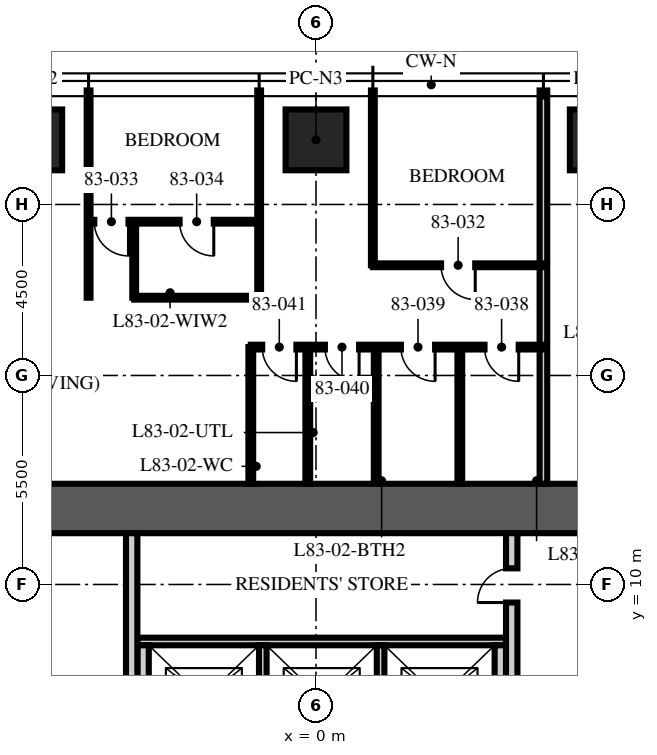
"""IFC4 building model, lengths in metres.
Left out: names, types, materials, properties, quantities, classifications, styles, units other than length and angle.
Written with IfcOpenShell. Run it as: python <this file> out.ifc"""

import sys

from ifc_helpers import new_model, si_unit, direction, frame, frame_2d, origin, origin_2d, place, context, subcontext, project, spatial, rectangle, extrude, element, fill, save


model = new_model("IFC4")
c1 = context("Model", 3, precision=1e-05, world=origin(), true_north=direction((0.0, 1.0)))
c2 = subcontext(c1, "Body", "Model", "MODEL_VIEW")
j1 = project(units=[si_unit("LENGTHUNIT", "METRE"), si_unit("PLANEANGLEUNIT", "RADIAN")], contexts=[c1])
p1 = place(None, origin())
s1 = spatial("IfcSite", under=j1, at=p1, CompositionType="ELEMENT")
p2 = place(p1, origin())
s2 = spatial("IfcBuilding", under=s1, at=p2, CompositionType="ELEMENT")
p3 = place(p2, frame((0.0, 0.0, 330.75)))
s3 = spatial("IfcBuildingStorey", under=s2, at=p3, CompositionType="ELEMENT", Elevation=330.75)
p4 = place(p3, frame((-15.5, 12.0, -0.25), z_axis=(0.0, 0.0, 1.0), x_axis=(1.0, 0.0, 0.0)))
e1 = element("IfcWall", 1, at=p4, inside=s3, PredefinedType="SHEAR", context=c2, shape_type="SweptSolid", body=[
    extrude(rectangle(XDim=31.0, YDim=1.3, at=frame_2d((15.5, 0.0))), origin(), (0.0, 0.0, 1.0), 3.75),
])
for number, where, z_axis, x_axis in (
    (2, (-7.48, 21.7, 0.0), (0.0, 0.0, 1.0), (1.0, 0.0, 0.0)),
    (3, (0.0, 21.7, 0.0), (0.0, 0.0, 1.0), (1.0, 0.0, 0.0)),
    (4, (7.48, 21.7, 0.0), (0.0, 0.0, 1.0), (1.0, 0.0, 0.0)),
):
    element("IfcColumn", number, at=place(p3, frame(where, z_axis=z_axis, x_axis=x_axis)), inside=s3, PredefinedType="COLUMN", context=c2, shape_type="SweptSolid", body=[
        extrude(rectangle(XDim=1.6, YDim=1.6, at=origin_2d()), origin(), (0.0, 0.0, 1.0), 3.75),
    ])
p5 = place(p3, frame((-4.7, 8.5, 0.0), z_axis=(0.0, 0.0, 1.0), x_axis=(1.0, 0.0, 0.0)))
e5 = element("IfcWall", 5, at=p5, inside=s3, PredefinedType="PARTITIONING", context=c2, shape_type="SweptSolid", body=[
    extrude(rectangle(XDim=9.7, YDim=0.2, at=frame_2d((4.85, 0.0))), origin(), (0.0, 0.0, 1.0), 3.5),
])
for number, where, z_axis, x_axis in (
    (6, (-4.55, 5.6, 0.0), (0.0, 0.0, 1.0), (0.0, 1.0, 0.0)),
    (7, (4.85, 5.6, 0.0), (0.0, 0.0, 1.0), (0.0, 1.0, 0.0)),
):
    element("IfcWall", number, at=place(p3, frame(where, z_axis=z_axis, x_axis=x_axis)), inside=s3, PredefinedType="PARTITIONING", context=c2, shape_type="SweptSolid", body=[
        extrude(rectangle(XDim=2.8, YDim=0.3, at=frame_2d((1.4, 0.0))), origin(), (0.0, 0.0, 1.0), 3.5),
    ])
for number, where, z_axis, x_axis in (
    (8, (-1.4, 5.6, 0.0), (0.0, 0.0, 1.0), (0.0, 1.0, 0.0)),
    (9, (1.7, 5.6, 0.0), (0.0, 0.0, 1.0), (0.0, 1.0, 0.0)),
):
    element("IfcWall", number, at=place(p3, frame(where, z_axis=z_axis, x_axis=x_axis)), inside=s3, PredefinedType="PARTITIONING", context=c2, shape_type="SweptSolid", body=[
        extrude(rectangle(XDim=2.8, YDim=0.2, at=frame_2d((1.4, 0.0))), origin(), (0.0, 0.0, 1.0), 3.5),
    ])
p6 = place(p3, frame((-4.85, 5.3, 0.0), z_axis=(0.0, 0.0, 1.0), x_axis=(0.0, 1.0, 0.0)))
e10 = element("IfcWall", 10, at=p6, inside=s3, PredefinedType="PARTITIONING", context=c2, shape_type="SweptSolid", body=[
    extrude(rectangle(XDim=6.05, YDim=0.3, at=frame_2d((3.025, 0.0))), origin(), (0.0, 0.0, 1.0), 3.5),
])
p7 = place(p3, frame((5.15, 5.3, 0.0), z_axis=(0.0, 0.0, 1.0), x_axis=(0.0, 1.0, 0.0)))
e11 = element("IfcWall", 11, at=p7, inside=s3, PredefinedType="PARTITIONING", context=c2, shape_type="SweptSolid", body=[
    extrude(rectangle(XDim=6.05, YDim=0.3, at=frame_2d((3.025, 0.0))), origin(), (0.0, 0.0, 1.0), 3.5),
])
p8 = place(p7, frame((4.225, 0.0, 0.0)))
e12 = element("IfcOpeningElement", 12, at=p8, cuts=e11, PredefinedType="OPENING", context=c2, shape_type="SweptSolid", body=[
    extrude(rectangle(XDim=0.9, YDim=2.1, at=frame_2d((0.45, 1.05))), frame((0.0, 0.16, 0.0), z_axis=(0.0, -1.0, 0.0), x_axis=(1.0, 0.0, 0.0)), (0.0, 0.0, 1.0), 0.32),
])
p9 = place(p3, frame((5.984, 12.65, 0.0), z_axis=(0.0, 0.0, 1.0), x_axis=(0.0, 1.0, 0.0)))
e13 = element("IfcWall", 13, at=p9, inside=s3, PredefinedType="PARTITIONING", context=c2, shape_type="SweptSolid", body=[
    extrude(rectangle(XDim=10.35, YDim=0.2, at=frame_2d((5.175, 0.0))), origin(), (0.0, 0.0, 1.0), 3.01),
])
p10 = place(p3, frame((1.496, 18.4, 0.0), z_axis=(0.0, 0.0, 1.0), x_axis=(0.0, 1.0, 0.0)))
e14 = element("IfcWall", 14, at=p10, inside=s3, PredefinedType="PARTITIONING", context=c2, shape_type="SweptSolid", body=[
    extrude(rectangle(XDim=4.6, YDim=0.1, at=frame_2d((2.3, 0.0))), origin(), (0.0, 0.0, 1.0), 3.01),
])
for number, where, z_axis, x_axis in (
    (15, (-1.496, 17.546, 0.0), (0.0, 0.0, 1.0), (0.0, 1.0, 0.0)),
    (16, (-5.984, 17.546, 0.0), (0.0, 0.0, 1.0), (0.0, 1.0, 0.0)),
):
    element("IfcWall", number, at=place(p3, frame(where, z_axis=z_axis, x_axis=x_axis)), inside=s3, PredefinedType="PARTITIONING", context=c2, shape_type="SweptSolid", body=[
        extrude(rectangle(XDim=5.454, YDim=0.1, at=frame_2d((2.727, 0.0))), origin(), (0.0, 0.0, 1.0), 3.01),
    ])
p11 = place(p3, frame((5.984, 18.4, 0.0), z_axis=(0.0, 0.0, 1.0), x_axis=(-1.0, 0.0, 0.0)))
e17 = element("IfcWall", 17, at=p11, inside=s3, PredefinedType="PARTITIONING", context=c2, shape_type="SweptSolid", body=[
    extrude(rectangle(XDim=4.488, YDim=0.1, at=frame_2d((2.244, 0.0))), origin(), (0.0, 0.0, 1.0), 2.91),
])
p12 = place(p11, frame((1.794, 0.0, 0.0)))
e18 = element("IfcOpeningElement", 18, at=p12, cuts=e17, PredefinedType="OPENING", context=c2, shape_type="SweptSolid", body=[
    extrude(rectangle(XDim=0.9, YDim=2.1, at=frame_2d((0.45, 1.05))), frame((0.0, 0.06, 0.0), z_axis=(0.0, -1.0, 0.0), x_axis=(1.0, 0.0, 0.0)), (0.0, 0.0, 1.0), 0.12),
])
p13 = place(p3, frame((-1.496, 19.546, 0.0), z_axis=(0.0, 0.0, 1.0), x_axis=(-1.0, 0.0, 0.0)))
e19 = element("IfcWall", 19, at=p13, inside=s3, PredefinedType="PARTITIONING", context=c2, shape_type="SweptSolid", body=[
    extrude(rectangle(XDim=4.488, YDim=0.1, at=frame_2d((2.244, 0.0))), origin(), (0.0, 0.0, 1.0), 2.91),
])
p14 = place(p13, frame((3.438, 0.0, 0.0)))
e20 = element("IfcOpeningElement", 20, at=p14, cuts=e19, PredefinedType="OPENING", context=c2, shape_type="SweptSolid", body=[
    extrude(rectangle(XDim=0.9, YDim=2.1, at=frame_2d((0.45, 1.05))), frame((0.0, 0.06, 0.0), z_axis=(0.0, -1.0, 0.0), x_axis=(1.0, 0.0, 0.0)), (0.0, 0.0, 1.0), 0.12),
])
p15 = place(p13, frame((1.194, 0.0, 0.0)))
e21 = element("IfcOpeningElement", 21, at=p15, cuts=e19, PredefinedType="OPENING", context=c2, shape_type="SweptSolid", body=[
    extrude(rectangle(XDim=0.9, YDim=2.1, at=frame_2d((0.45, 1.05))), frame((0.0, 0.06, 0.0), z_axis=(0.0, -1.0, 0.0), x_axis=(1.0, 0.0, 0.0)), (0.0, 0.0, 1.0), 0.12),
])
p16 = place(p3, frame((-4.784, 17.546, 0.0), z_axis=(0.0, 0.0, 1.0), x_axis=(0.0, 1.0, 0.0)))
e22 = element("IfcWall", 22, at=p16, inside=s3, PredefinedType="PARTITIONING", context=c2, shape_type="SweptSolid", body=[
    extrude(rectangle(XDim=2.0, YDim=0.1, at=frame_2d((1.0, 0.0))), origin(), (0.0, 0.0, 1.0), 3.5),
])
p17 = place(p3, frame((-1.496, 17.546, 0.0), z_axis=(0.0, 0.0, 1.0), x_axis=(-1.0, 0.0, 0.0)))
e23 = element("IfcWall", 23, at=p17, inside=s3, PredefinedType="PARTITIONING", context=c2, shape_type="SweptSolid", body=[
    extrude(rectangle(XDim=3.288, YDim=0.1, at=frame_2d((1.644, 0.0))), origin(), (0.0, 0.0, 1.0), 2.91),
])
p18 = place(p3, frame((5.984, 16.246, 0.0), z_axis=(0.0, 0.0, 1.0), x_axis=(-1.0, 0.0, 0.0)))
e24 = element("IfcWall", 24, at=p18, inside=s3, PredefinedType="PARTITIONING", context=c2, shape_type="SweptSolid", body=[
    extrude(rectangle(XDim=7.7, YDim=0.125, at=frame_2d((3.85, 0.0))), origin(), (0.0, 0.0, 1.0), 2.9),
])
p19 = place(p18, frame((0.65, 0.0, 0.0)))
e25 = element("IfcOpeningElement", 25, at=p19, cuts=e24, PredefinedType="OPENING", context=c2, shape_type="SweptSolid", body=[
    extrude(rectangle(XDim=0.9, YDim=2.1, at=frame_2d((0.45, 1.05))), frame((0.0, 0.073, 0.0), z_axis=(0.0, -1.0, 0.0), x_axis=(1.0, 0.0, 0.0)), (0.0, 0.0, 1.0), 0.145),
])
p20 = place(p18, frame((2.85, 0.0, 0.0)))
e26 = element("IfcOpeningElement", 26, at=p20, cuts=e24, PredefinedType="OPENING", context=c2, shape_type="SweptSolid", body=[
    extrude(rectangle(XDim=0.9, YDim=2.1, at=frame_2d((0.45, 1.05))), frame((0.0, 0.073, 0.0), z_axis=(0.0, -1.0, 0.0), x_axis=(1.0, 0.0, 0.0)), (0.0, 0.0, 1.0), 0.145),
])
p21 = place(p18, frame((4.85, 0.0, 0.0)))
e27 = element("IfcOpeningElement", 27, at=p21, cuts=e24, PredefinedType="OPENING", context=c2, shape_type="SweptSolid", body=[
    extrude(rectangle(XDim=0.9, YDim=2.1, at=frame_2d((0.45, 1.05))), frame((0.0, 0.073, 0.0), z_axis=(0.0, -1.0, 0.0), x_axis=(1.0, 0.0, 0.0)), (0.0, 0.0, 1.0), 0.145),
])
p22 = place(p18, frame((6.5, 0.0, 0.0)))
e28 = element("IfcOpeningElement", 28, at=p22, cuts=e24, PredefinedType="OPENING", context=c2, shape_type="SweptSolid", body=[
    extrude(rectangle(XDim=0.9, YDim=2.1, at=frame_2d((0.45, 1.05))), frame((0.0, 0.073, 0.0), z_axis=(0.0, -1.0, 0.0), x_axis=(1.0, 0.0, 0.0)), (0.0, 0.0, 1.0), 0.145),
])
p23 = place(p3, frame((3.784, 12.65, 0.0), z_axis=(0.0, 0.0, 1.0), x_axis=(0.0, 1.0, 0.0)))
e29 = element("IfcWall", 29, at=p23, inside=s3, PredefinedType="PARTITIONING", context=c2, shape_type="SweptSolid", body=[
    extrude(rectangle(XDim=3.596, YDim=0.125, at=frame_2d((1.798, 0.0))), origin(), (0.0, 0.0, 1.0), 2.91),
])
for number, where, z_axis, x_axis in (
    (30, (1.584, 12.65, 0.0), (0.0, 0.0, 1.0), (0.0, 1.0, 0.0)),
    (31, (-0.216, 12.65, 0.0), (0.0, 0.0, 1.0), (0.0, 1.0, 0.0)),
    (32, (-1.716, 12.65, 0.0), (0.0, 0.0, 1.0), (0.0, 1.0, 0.0)),
):
    element("IfcWall", number, at=place(p3, frame(where, z_axis=z_axis, x_axis=x_axis)), inside=s3, PredefinedType="PARTITIONING", context=c2, shape_type="SweptSolid", body=[
        extrude(rectangle(XDim=3.596, YDim=0.125, at=frame_2d((1.798, 0.0))), origin(), (0.0, 0.0, 1.0), 3.5),
    ])
p24 = place(p8, origin())
e33 = element("IfcDoor", 33, at=p24, inside=s3, OperationType="SINGLE_SWING_LEFT", PredefinedType="DOOR", context=c2, shape_type="SweptSolid", body=[
    extrude(rectangle(XDim=0.9, YDim=2.1, at=frame_2d((0.45, 1.05))), frame((0.0, 0.025, 0.0), z_axis=(0.0, -1.0, 0.0), x_axis=(1.0, 0.0, 0.0)), (0.0, 0.0, 1.0), 0.05),
])
fill(e12, e33)
p25 = place(p12, origin())
e34 = element("IfcDoor", 34, at=p25, inside=s3, OperationType="SINGLE_SWING_LEFT", PredefinedType="DOOR", context=c2, shape_type="SweptSolid", body=[
    extrude(rectangle(XDim=0.9, YDim=2.1, at=frame_2d((0.45, 1.05))), frame((0.0, 0.025, 0.0), z_axis=(0.0, -1.0, 0.0), x_axis=(1.0, 0.0, 0.0)), (0.0, 0.0, 1.0), 0.05),
])
fill(e18, e34)
p26 = place(p14, origin())
e35 = element("IfcDoor", 35, at=p26, inside=s3, OperationType="SINGLE_SWING_LEFT", PredefinedType="DOOR", context=c2, shape_type="SweptSolid", body=[
    extrude(rectangle(XDim=0.9, YDim=2.1, at=frame_2d((0.45, 1.05))), frame((0.0, 0.025, 0.0), z_axis=(0.0, -1.0, 0.0), x_axis=(1.0, 0.0, 0.0)), (0.0, 0.0, 1.0), 0.05),
])
fill(e20, e35)
p27 = place(p15, origin())
e36 = element("IfcDoor", 36, at=p27, inside=s3, OperationType="SINGLE_SWING_LEFT", PredefinedType="DOOR", context=c2, shape_type="SweptSolid", body=[
    extrude(rectangle(XDim=0.9, YDim=2.1, at=frame_2d((0.45, 1.05))), frame((0.0, 0.025, 0.0), z_axis=(0.0, -1.0, 0.0), x_axis=(1.0, 0.0, 0.0)), (0.0, 0.0, 1.0), 0.05),
])
fill(e21, e36)
p28 = place(p19, origin())
e37 = element("IfcDoor", 37, at=p28, inside=s3, OperationType="SINGLE_SWING_LEFT", PredefinedType="DOOR", context=c2, shape_type="SweptSolid", body=[
    extrude(rectangle(XDim=0.9, YDim=2.1, at=frame_2d((0.45, 1.05))), frame((0.0, 0.025, 0.0), z_axis=(0.0, -1.0, 0.0), x_axis=(1.0, 0.0, 0.0)), (0.0, 0.0, 1.0), 0.05),
])
fill(e25, e37)
p29 = place(p20, origin())
e38 = element("IfcDoor", 38, at=p29, inside=s3, OperationType="SINGLE_SWING_LEFT", PredefinedType="DOOR", context=c2, shape_type="SweptSolid", body=[
    extrude(rectangle(XDim=0.9, YDim=2.1, at=frame_2d((0.45, 1.05))), frame((0.0, 0.025, 0.0), z_axis=(0.0, -1.0, 0.0), x_axis=(1.0, 0.0, 0.0)), (0.0, 0.0, 1.0), 0.05),
])
fill(e26, e38)
p30 = place(p21, origin())
e39 = element("IfcDoor", 39, at=p30, inside=s3, OperationType="SINGLE_SWING_LEFT", PredefinedType="DOOR", context=c2, shape_type="SweptSolid", body=[
    extrude(rectangle(XDim=0.9, YDim=2.1, at=frame_2d((0.45, 1.05))), frame((0.0, 0.025, 0.0), z_axis=(0.0, -1.0, 0.0), x_axis=(1.0, 0.0, 0.0)), (0.0, 0.0, 1.0), 0.05),
])
fill(e27, e39)
p31 = place(p22, origin())
e40 = element("IfcDoor", 40, at=p31, inside=s3, OperationType="SINGLE_SWING_LEFT", PredefinedType="DOOR", context=c2, shape_type="SweptSolid", body=[
    extrude(rectangle(XDim=0.9, YDim=2.1, at=frame_2d((0.45, 1.05))), frame((0.0, 0.025, 0.0), z_axis=(0.0, -1.0, 0.0), x_axis=(1.0, 0.0, 0.0)), (0.0, 0.0, 1.0), 0.05),
])
fill(e28, e40)
save(model, sys.argv[1])
